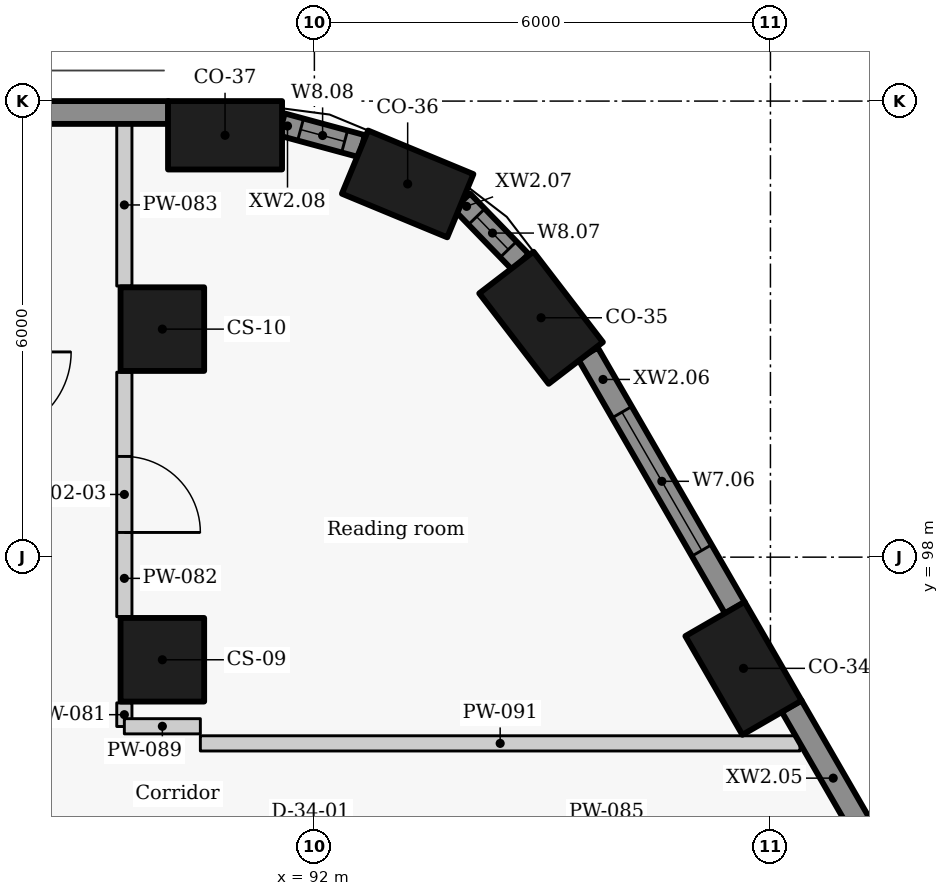
"""IFC4 building model, lengths in metres.
Left out: names, types, materials, properties, quantities, classifications, styles, units other than length and angle.
Written with IfcOpenShell. Run it as: python <this file> out.ifc"""

import sys

from ifc_helpers import new_model, si_unit, direction, frame, frame_2d, origin, origin_2d, place, context, subcontext, project, spatial, rectangle, extrude, element, fill, save


model = new_model("IFC4")
c1 = context("Model", 3, precision=1e-05, world=origin(), true_north=direction((0.0, 1.0)))
c2 = subcontext(c1, "Body", "Model", "MODEL_VIEW")
j1 = project(units=[si_unit("LENGTHUNIT", "METRE"), si_unit("PLANEANGLEUNIT", "RADIAN")], contexts=[c1])
p1 = place(None, origin())
s1 = spatial("IfcSite", under=j1, at=p1, CompositionType="ELEMENT")
p2 = place(p1, origin())
s2 = spatial("IfcBuilding", under=s1, at=p2, CompositionType="ELEMENT")
p3 = place(p2, frame((0.0, 0.0, 67.8)))
s3 = spatial("IfcBuildingStorey", under=s2, at=p3, CompositionType="ELEMENT", Elevation=67.8)
for number, where, z_axis, x_axis in (
    (1, (97.646, 96.537, 0.0), (0.0, 0.0, 1.0), (-0.5, 0.866, 0.0)),
    (2, (94.982, 101.149, 0.0), (0.0, 0.0, 1.0), (-0.609, 0.793, 0.0)),
    (3, (93.227, 102.91, 0.0), (0.0, 0.0, 1.0), (-0.924, 0.383, 0.0)),
    (4, (90.825, 103.55, 0.0), (0.0, 0.0, 1.0), (-1.0, 0.0, 0.0)),
):
    element("IfcColumn", number, at=place(p3, frame(where, z_axis=z_axis, x_axis=x_axis)), inside=s3, PredefinedType="COLUMN", context=c2, shape_type="SweptSolid", body=[
        extrude(rectangle(XDim=1.5, YDim=0.9, at=origin_2d()), origin(), (0.0, 0.0, 1.0), 3.3),
    ])
for number, where, z_axis, x_axis in (
    (5, (90.0, 96.65, 0.0), (0.0, 0.0, 1.0), (0.0, 1.0, 0.0)),
    (6, (90.0, 101.0, 0.0), (0.0, 0.0, 1.0), (0.0, 1.0, 0.0)),
):
    element("IfcColumn", number, at=place(p3, frame(where, z_axis=z_axis, x_axis=x_axis)), inside=s3, PredefinedType="COLUMN", context=c2, shape_type="SweptSolid", body=[
        extrude(rectangle(XDim=1.1, YDim=1.1, at=origin_2d()), origin(), (0.0, 0.0, 1.0), 3.3),
    ])
p4 = place(p3, frame((100.195, 92.721, 0.0), z_axis=(0.0, 0.0, 1.0), x_axis=(-0.500001735503, 0.866024401789, 0.0)))
e7 = element("IfcWall", 7, at=p4, inside=s3, PredefinedType="SOLIDWALL", context=c2, shape_type="SweptSolid", body=[
    extrude(rectangle(XDim=3.834, YDim=0.3, at=frame_2d((1.917, 0.0))), origin(), (0.0, 0.0, 1.0), 2.05),
])
p5 = place(p4, frame((0.344, 0.0, 0.0)))
e8 = element("IfcOpeningElement", 8, at=p5, cuts=e7, PredefinedType="OPENING", context=c2, shape_type="SweptSolid", body=[
    extrude(rectangle(XDim=1.2, YDim=2.0, at=frame_2d((0.6, 1.0))), frame((0.0, 0.16, 0.0), z_axis=(0.0, -1.0, 0.0), x_axis=(1.0, 0.0, 0.0)), (0.0, 0.0, 1.0), 0.32),
])
p6 = place(p3, frame((97.532, 97.333, 0.0), z_axis=(0.0, 0.0, 1.0), x_axis=(-0.499948341072, 0.866055227026, 0.0)))
e9 = element("IfcWall", 9, at=p6, inside=s3, PredefinedType="SOLIDWALL", context=c2, shape_type="SweptSolid", body=[
    extrude(rectangle(XDim=3.867, YDim=0.3, at=frame_2d((1.934, 0.0))), origin(), (0.0, 0.0, 1.0), 2.05),
])
p7 = place(p6, frame((0.872, 0.0, 0.9)))
e10 = element("IfcOpeningElement", 10, at=p7, cuts=e9, PredefinedType="OPENING", context=c2, shape_type="SweptSolid", body=[
    extrude(rectangle(XDim=2.1, YDim=1.1, at=frame_2d((1.05, 0.55))), frame((0.0, 0.16, 0.0), z_axis=(0.0, -1.0, 0.0), x_axis=(1.0, 0.0, 0.0)), (0.0, 0.0, 1.0), 0.32),
])
p8 = place(p3, frame((94.713, 101.883, 0.0), z_axis=(0.0, 0.0, 1.0), x_axis=(-0.696138968055, 0.717907053285, 0.0)))
e11 = element("IfcWall", 11, at=p8, inside=s3, PredefinedType="SOLIDWALL", context=c2, shape_type="SweptSolid", body=[
    extrude(rectangle(XDim=1.11, YDim=0.3, at=frame_2d((0.555, 0.0))), origin(), (0.0, 0.0, 1.0), 2.05),
])
p9 = place(p8, frame((0.231, 0.0, 0.9)))
e12 = element("IfcOpeningElement", 12, at=p9, cuts=e11, PredefinedType="OPENING", context=c2, shape_type="SweptSolid", body=[
    extrude(rectangle(XDim=0.6, YDim=1.1, at=frame_2d((0.3, 0.55))), frame((0.0, 0.16, 0.0), z_axis=(0.0, -1.0, 0.0), x_axis=(1.0, 0.0, 0.0)), (0.0, 0.0, 1.0), 0.32),
])
p10 = place(p3, frame((92.625, 103.407, 0.0), z_axis=(0.0, 0.0, 1.0), x_axis=(-0.96522637192, 0.261415475728, 0.0)))
e13 = element("IfcWall", 13, at=p10, inside=s3, PredefinedType="SOLIDWALL", context=c2, shape_type="SweptSolid", body=[
    extrude(rectangle(XDim=1.093, YDim=0.3, at=frame_2d((0.546, 0.0))), origin(), (0.0, 0.0, 1.0), 2.05),
])
p11 = place(p10, frame((0.236, 0.0, 0.9)))
e14 = element("IfcOpeningElement", 14, at=p11, cuts=e13, PredefinedType="OPENING", context=c2, shape_type="SweptSolid", body=[
    extrude(rectangle(XDim=0.6, YDim=1.1, at=frame_2d((0.3, 0.55))), frame((0.0, 0.16, 0.0), z_axis=(0.0, -1.0, 0.0), x_axis=(1.0, 0.0, 0.0)), (0.0, 0.0, 1.0), 0.32),
])
p12 = place(p3, frame((90.079, 103.85, 0.0), z_axis=(0.0, 0.0, 1.0), x_axis=(-1.0, 0.0, 0.0)))
e15 = element("IfcWall", 15, at=p12, inside=s3, PredefinedType="SOLIDWALL", context=c2, shape_type="SweptSolid", body=[
    extrude(rectangle(XDim=20.19, YDim=0.3, at=frame_2d((10.095, 0.0))), origin(), (0.0, 0.0, 1.0), 2.05),
])
p13 = place(p3, frame((89.5, 95.772, 0.0), z_axis=(0.0, 0.0, 1.0), x_axis=(0.0, 1.0, 0.0)))
e16 = element("IfcWall", 16, at=p13, inside=s3, PredefinedType="PARTITIONING", context=c2, shape_type="SweptSolid", body=[
    extrude(rectangle(XDim=0.311, YDim=0.2, at=frame_2d((0.156, 0.0))), origin(), (0.0, 0.0, 1.0), 2.95),
])
p14 = place(p3, frame((89.5, 100.433, 0.0), z_axis=(0.0, 0.0, 1.0), x_axis=(0.0, -1.0, 0.0)))
e17 = element("IfcWall", 17, at=p14, inside=s3, PredefinedType="PARTITIONING", context=c2, shape_type="SweptSolid", body=[
    extrude(rectangle(XDim=3.216, YDim=0.2, at=frame_2d((1.608, 0.0))), origin(), (0.0, 0.0, 1.0), 2.95),
])
p15 = place(p14, frame((1.108, 0.0, 0.0)))
e18 = element("IfcOpeningElement", 18, at=p15, cuts=e17, PredefinedType="OPENING", context=c2, shape_type="SweptSolid", body=[
    extrude(rectangle(XDim=1.0, YDim=2.1, at=frame_2d((0.5, 1.05))), frame((0.0, 0.11, 0.0), z_axis=(0.0, -1.0, 0.0), x_axis=(1.0, 0.0, 0.0)), (0.0, 0.0, 1.0), 0.22),
])
p16 = place(p3, frame((89.5, 101.567, 0.0), z_axis=(0.0, 0.0, 1.0), x_axis=(0.0, 1.0, 0.0)))
e19 = element("IfcWall", 19, at=p16, inside=s3, PredefinedType="PARTITIONING", context=c2, shape_type="SweptSolid", body=[
    extrude(rectangle(XDim=2.133, YDim=0.2, at=frame_2d((1.066, 0.0))), origin(), (0.0, 0.0, 1.0), 2.95),
])
p17 = place(p3, frame((89.5, 95.775, 0.0), z_axis=(0.0, 0.0, 1.0), x_axis=(1.0, 0.0, 0.0)))
e20 = element("IfcWall", 20, at=p17, inside=s3, PredefinedType="PARTITIONING", context=c2, shape_type="SweptSolid", body=[
    extrude(rectangle(XDim=1.0, YDim=0.2, at=frame_2d((0.5, 0.0))), origin(), (0.0, 0.0, 1.0), 2.43),
])
p18 = place(p3, frame((90.5, 95.55, 0.0), z_axis=(0.0, 0.0, 1.0), x_axis=(1.0, 0.0, 0.0)))
e21 = element("IfcWall", 21, at=p18, inside=s3, PredefinedType="PARTITIONING", context=c2, shape_type="SweptSolid", body=[
    extrude(rectangle(XDim=7.889, YDim=0.2, at=frame_2d((3.944, 0.0))), origin(), (0.0, 0.0, 1.0), 2.03),
])
p19 = place(p7, origin())
e22 = element("IfcWindow", 22, at=p19, inside=s3, PartitioningType="SINGLE_PANEL", PredefinedType="WINDOW", context=c2, shape_type="SweptSolid", body=[
    extrude(rectangle(XDim=2.1, YDim=1.1, at=frame_2d((1.05, 0.55))), frame((0.0, 0.03, 0.0), z_axis=(0.0, -1.0, 0.0), x_axis=(1.0, 0.0, 0.0)), (0.0, 0.0, 1.0), 0.06),
])
fill(e10, e22)
p20 = place(p9, origin())
e23 = element("IfcWindow", 23, at=p20, inside=s3, PartitioningType="SINGLE_PANEL", PredefinedType="WINDOW", context=c2, shape_type="SweptSolid", body=[
    extrude(rectangle(XDim=0.6, YDim=1.1, at=frame_2d((0.3, 0.55))), frame((0.0, 0.03, 0.0), z_axis=(0.0, -1.0, 0.0), x_axis=(1.0, 0.0, 0.0)), (0.0, 0.0, 1.0), 0.06),
])
fill(e12, e23)
p21 = place(p11, origin())
e24 = element("IfcWindow", 24, at=p21, inside=s3, PartitioningType="SINGLE_PANEL", PredefinedType="WINDOW", context=c2, shape_type="SweptSolid", body=[
    extrude(rectangle(XDim=0.6, YDim=1.1, at=frame_2d((0.3, 0.55))), frame((0.0, 0.03, 0.0), z_axis=(0.0, -1.0, 0.0), x_axis=(1.0, 0.0, 0.0)), (0.0, 0.0, 1.0), 0.06),
])
fill(e14, e24)
p22 = place(p15, origin())
e25 = element("IfcDoor", 25, at=p22, inside=s3, OperationType="SINGLE_SWING_RIGHT", PredefinedType="DOOR", context=c2, shape_type="SweptSolid", body=[
    extrude(rectangle(XDim=1.0, YDim=2.1, at=frame_2d((0.5, 1.05))), frame((0.0, 0.025, 0.0), z_axis=(0.0, -1.0, 0.0), x_axis=(1.0, 0.0, 0.0)), (0.0, 0.0, 1.0), 0.05),
])
fill(e18, e25)
save(model, sys.argv[1])
